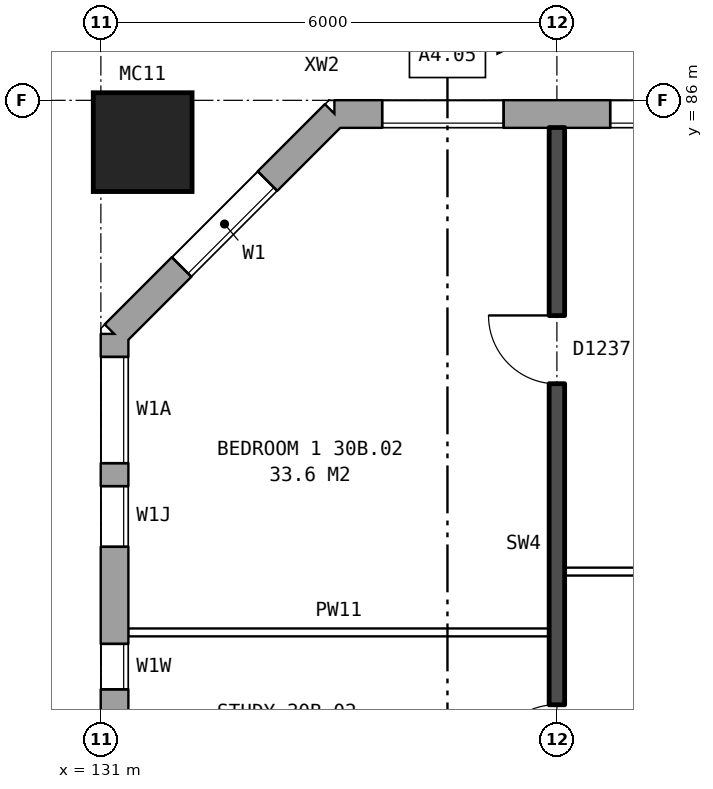
"""IFC4 building model, lengths in metres.
Left out: names, types, materials, properties, quantities, classifications, styles, units other than length and angle.
Written with IfcOpenShell. Run it as: python <this file> out.ifc"""

import sys

from ifc_helpers import new_model, si_unit, direction, frame, frame_2d, origin, origin_2d, place, context, subcontext, project, spatial, rectangle, hollow_rectangle, extrude, element, fill, save


model = new_model("IFC4")
c1 = context("Model", 3, precision=1e-05, world=origin(), true_north=direction((0.0, 1.0)))
c2 = subcontext(c1, "Body", "Model", "MODEL_VIEW")
j1 = project(units=[si_unit("LENGTHUNIT", "METRE"), si_unit("PLANEANGLEUNIT", "RADIAN")], contexts=[c1])
p1 = place(None, origin())
s1 = spatial("IfcSite", under=j1, at=p1, CompositionType="ELEMENT")
p2 = place(p1, origin())
s2 = spatial("IfcBuilding", under=s1, at=p2, CompositionType="ELEMENT")
p3 = place(p2, frame((0.0, 0.0, 108.8)))
s3 = spatial("IfcBuildingStorey", under=s2, at=p3, CompositionType="ELEMENT", Elevation=108.8)
p4 = place(p3, frame((131.55, 85.45, 0.0), z_axis=(0.0, 0.0, 1.0), x_axis=(1.0, 0.0, 0.0)))
e1 = element("IfcColumn", 1, at=p4, inside=s3, PredefinedType="COLUMN", context=c2, shape_type="SweptSolid", body=[
    extrude(hollow_rectangle(XDim=1.3, YDim=1.3, WallThickness=0.07, at=origin_2d()), origin(), (0.0, 0.0, 1.0), 3.1),
])
p5 = place(p3, frame((170.925, 85.82, 0.0), z_axis=(0.0, 0.0, 1.0), x_axis=(-1.0, 0.0, 0.0)))
e2 = element("IfcWall", 2, at=p5, inside=s3, PredefinedType="STANDARD", context=c2, shape_type="SweptSolid", body=[
    extrude(rectangle(XDim=36.851, YDim=0.36, at=frame_2d((18.425, 0.0))), origin(), (0.0, 0.0, 1.0), 2.85),
])
p6 = place(p5, frame((1.625, 0.0, 0.8)))
e3 = element("IfcOpeningElement", 3, at=p6, cuts=e2, PredefinedType="OPENING", context=c2, shape_type="SweptSolid", body=[
    extrude(rectangle(XDim=1.6, YDim=1.8, at=frame_2d((0.8, 0.9))), frame((0.0, 0.19, 0.0), z_axis=(0.0, -1.0, 0.0), x_axis=(1.0, 0.0, 0.0)), (0.0, 0.0, 1.0), 0.38),
])
p7 = place(p5, frame((4.625, 0.0, 0.8)))
e4 = element("IfcOpeningElement", 4, at=p7, cuts=e2, PredefinedType="OPENING", context=c2, shape_type="SweptSolid", body=[
    extrude(rectangle(XDim=1.6, YDim=1.8, at=frame_2d((0.8, 0.9))), frame((0.0, 0.19, 0.0), z_axis=(0.0, -1.0, 0.0), x_axis=(1.0, 0.0, 0.0)), (0.0, 0.0, 1.0), 0.38),
])
p8 = place(p5, frame((7.625, 0.0, 0.8)))
e5 = element("IfcOpeningElement", 5, at=p8, cuts=e2, PredefinedType="OPENING", context=c2, shape_type="SweptSolid", body=[
    extrude(rectangle(XDim=1.6, YDim=1.8, at=frame_2d((0.8, 0.9))), frame((0.0, 0.19, 0.0), z_axis=(0.0, -1.0, 0.0), x_axis=(1.0, 0.0, 0.0)), (0.0, 0.0, 1.0), 0.38),
])
p9 = place(p5, frame((10.625, 0.0, 0.8)))
e6 = element("IfcOpeningElement", 6, at=p9, cuts=e2, PredefinedType="OPENING", context=c2, shape_type="SweptSolid", body=[
    extrude(rectangle(XDim=1.6, YDim=1.8, at=frame_2d((0.8, 0.9))), frame((0.0, 0.19, 0.0), z_axis=(0.0, -1.0, 0.0), x_axis=(1.0, 0.0, 0.0)), (0.0, 0.0, 1.0), 0.38),
])
p10 = place(p5, frame((12.525, 0.0, 1.7)))
e7 = element("IfcOpeningElement", 7, at=p10, cuts=e2, PredefinedType="OPENING", context=c2, shape_type="SweptSolid", body=[
    extrude(rectangle(XDim=0.6, YDim=0.9, at=frame_2d((0.3, 0.45))), frame((0.0, 0.19, 0.0), z_axis=(0.0, -1.0, 0.0), x_axis=(1.0, 0.0, 0.0)), (0.0, 0.0, 1.0), 0.38),
])
p11 = place(p5, frame((16.625, 0.0, 0.8)))
e8 = element("IfcOpeningElement", 8, at=p11, cuts=e2, PredefinedType="OPENING", context=c2, shape_type="SweptSolid", body=[
    extrude(rectangle(XDim=1.6, YDim=1.8, at=frame_2d((0.8, 0.9))), frame((0.0, 0.19, 0.0), z_axis=(0.0, -1.0, 0.0), x_axis=(1.0, 0.0, 0.0)), (0.0, 0.0, 1.0), 0.38),
])
p12 = place(p5, frame((19.625, 0.0, 0.8)))
e9 = element("IfcOpeningElement", 9, at=p12, cuts=e2, PredefinedType="OPENING", context=c2, shape_type="SweptSolid", body=[
    extrude(rectangle(XDim=1.6, YDim=1.8, at=frame_2d((0.8, 0.9))), frame((0.0, 0.19, 0.0), z_axis=(0.0, -1.0, 0.0), x_axis=(1.0, 0.0, 0.0)), (0.0, 0.0, 1.0), 0.38),
])
p13 = place(p5, frame((22.125, 0.0, 0.15)))
e10 = element("IfcOpeningElement", 10, at=p13, cuts=e2, PredefinedType="OPENING", context=c2, shape_type="SweptSolid", body=[
    extrude(rectangle(XDim=1.2, YDim=0.9, at=frame_2d((0.6, 0.45))), frame((0.0, 0.19, 0.0), z_axis=(0.0, -1.0, 0.0), x_axis=(1.0, 0.0, 0.0)), (0.0, 0.0, 1.0), 0.38),
])
p14 = place(p5, frame((25.625, 0.0, 0.8)))
e11 = element("IfcOpeningElement", 11, at=p14, cuts=e2, PredefinedType="OPENING", context=c2, shape_type="SweptSolid", body=[
    extrude(rectangle(XDim=1.6, YDim=1.8, at=frame_2d((0.8, 0.9))), frame((0.0, 0.19, 0.0), z_axis=(0.0, -1.0, 0.0), x_axis=(1.0, 0.0, 0.0)), (0.0, 0.0, 1.0), 0.38),
])
p15 = place(p5, frame((28.625, 0.0, 0.8)))
e12 = element("IfcOpeningElement", 12, at=p15, cuts=e2, PredefinedType="OPENING", context=c2, shape_type="SweptSolid", body=[
    extrude(rectangle(XDim=1.6, YDim=1.8, at=frame_2d((0.8, 0.9))), frame((0.0, 0.19, 0.0), z_axis=(0.0, -1.0, 0.0), x_axis=(1.0, 0.0, 0.0)), (0.0, 0.0, 1.0), 0.38),
])
p16 = place(p5, frame((31.625, 0.0, 0.8)))
e13 = element("IfcOpeningElement", 13, at=p16, cuts=e2, PredefinedType="OPENING", context=c2, shape_type="SweptSolid", body=[
    extrude(rectangle(XDim=1.6, YDim=1.8, at=frame_2d((0.8, 0.9))), frame((0.0, 0.19, 0.0), z_axis=(0.0, -1.0, 0.0), x_axis=(1.0, 0.0, 0.0)), (0.0, 0.0, 1.0), 0.38),
])
p17 = place(p5, frame((34.625, 0.0, 0.8)))
e14 = element("IfcOpeningElement", 14, at=p17, cuts=e2, PredefinedType="OPENING", context=c2, shape_type="SweptSolid", body=[
    extrude(rectangle(XDim=1.6, YDim=1.8, at=frame_2d((0.8, 0.9))), frame((0.0, 0.19, 0.0), z_axis=(0.0, -1.0, 0.0), x_axis=(1.0, 0.0, 0.0)), (0.0, 0.0, 1.0), 0.38),
])
p18 = place(p5, frame((14.275, 0.0, 0.8)))
e15 = element("IfcOpeningElement", 15, at=p18, cuts=e2, PredefinedType="OPENING", context=c2, shape_type="SweptSolid", body=[
    extrude(rectangle(XDim=1.4, YDim=0.9, at=frame_2d((0.7, 0.45))), frame((0.0, 0.19, 0.0), z_axis=(0.0, -1.0, 0.0), x_axis=(1.0, 0.0, 0.0)), (0.0, 0.0, 1.0), 0.38),
])
p19 = place(p5, frame((23.775, 0.0, 1.65)))
e16 = element("IfcOpeningElement", 16, at=p19, cuts=e2, PredefinedType="OPENING", context=c2, shape_type="SweptSolid", body=[
    extrude(rectangle(XDim=1.0, YDim=0.9, at=frame_2d((0.5, 0.45))), frame((0.0, 0.19, 0.0), z_axis=(0.0, -1.0, 0.0), x_axis=(1.0, 0.0, 0.0)), (0.0, 0.0, 1.0), 0.38),
])
p20 = place(p3, frame((134.075, 85.82, 0.0), z_axis=(0.0, 0.0, 1.0), x_axis=(-0.707106781187, -0.707106781187, 0.0)))
e17 = element("IfcWall", 17, at=p20, inside=s3, PredefinedType="STANDARD", context=c2, shape_type="SweptSolid", body=[
    extrude(rectangle(XDim=4.094, YDim=0.36, at=frame_2d((2.047, 0.0))), origin(), (0.0, 0.0, 1.0), 2.85),
])
p21 = place(p20, frame((1.247, 0.0, 0.8)))
e18 = element("IfcOpeningElement", 18, at=p21, cuts=e17, PredefinedType="OPENING", context=c2, shape_type="SweptSolid", body=[
    extrude(rectangle(XDim=1.6, YDim=1.8, at=frame_2d((0.8, 0.9))), frame((0.0, 0.19, 0.0), z_axis=(0.0, -1.0, 0.0), x_axis=(1.0, 0.0, 0.0)), (0.0, 0.0, 1.0), 0.38),
])
p22 = place(p3, frame((131.18, 82.925, 0.0), z_axis=(0.0, 0.0, 1.0), x_axis=(0.0, -1.0, 0.0)))
e19 = element("IfcWall", 19, at=p22, inside=s3, PredefinedType="STANDARD", context=c2, shape_type="SweptSolid", body=[
    extrude(rectangle(XDim=25.851, YDim=0.36, at=frame_2d((12.925, 0.0))), origin(), (0.0, 0.0, 1.0), 2.85),
])
p23 = place(p22, frame((0.3, 0.0, 0.8)))
e20 = element("IfcOpeningElement", 20, at=p23, cuts=e19, PredefinedType="OPENING", context=c2, shape_type="SweptSolid", body=[
    extrude(rectangle(XDim=1.4, YDim=1.8, at=frame_2d((0.7, 0.9))), frame((0.0, 0.19, 0.0), z_axis=(0.0, -1.0, 0.0), x_axis=(1.0, 0.0, 0.0)), (0.0, 0.0, 1.0), 0.38),
])
p24 = place(p22, frame((4.075, 0.0, 0.25)))
e21 = element("IfcOpeningElement", 21, at=p24, cuts=e19, PredefinedType="OPENING", context=c2, shape_type="SweptSolid", body=[
    extrude(rectangle(XDim=0.6, YDim=0.9, at=frame_2d((0.3, 0.45))), frame((0.0, 0.19, 0.0), z_axis=(0.0, -1.0, 0.0), x_axis=(1.0, 0.0, 0.0)), (0.0, 0.0, 1.0), 0.38),
])
p25 = place(p22, frame((19.225, 0.0, 1.7)))
e22 = element("IfcOpeningElement", 22, at=p25, cuts=e19, PredefinedType="OPENING", context=c2, shape_type="SweptSolid", body=[
    extrude(rectangle(XDim=1.6, YDim=0.9, at=frame_2d((0.8, 0.45))), frame((0.0, 0.19, 0.0), z_axis=(0.0, -1.0, 0.0), x_axis=(1.0, 0.0, 0.0)), (0.0, 0.0, 1.0), 0.38),
])
p26 = place(p22, frame((21.975, 0.0, 0.8)))
e23 = element("IfcOpeningElement", 23, at=p26, cuts=e19, PredefinedType="OPENING", context=c2, shape_type="SweptSolid", body=[
    extrude(rectangle(XDim=1.2, YDim=0.9, at=frame_2d((0.6, 0.45))), frame((0.0, 0.19, 0.0), z_axis=(0.0, -1.0, 0.0), x_axis=(1.0, 0.0, 0.0)), (0.0, 0.0, 1.0), 0.38),
])
p27 = place(p22, frame((2.0, 0.0, 0.8)))
e24 = element("IfcOpeningElement", 24, at=p27, cuts=e19, PredefinedType="OPENING", context=c2, shape_type="SweptSolid", body=[
    extrude(rectangle(XDim=0.8, YDim=1.5, at=frame_2d((0.4, 0.75))), frame((0.0, 0.19, 0.0), z_axis=(0.0, -1.0, 0.0), x_axis=(1.0, 0.0, 0.0)), (0.0, 0.0, 1.0), 0.38),
])
p28 = place(p22, frame((5.075, 0.0, 1.65)))
e25 = element("IfcOpeningElement", 25, at=p28, cuts=e19, PredefinedType="OPENING", context=c2, shape_type="SweptSolid", body=[
    extrude(rectangle(XDim=1.4, YDim=0.9, at=frame_2d((0.7, 0.45))), frame((0.0, 0.19, 0.0), z_axis=(0.0, -1.0, 0.0), x_axis=(1.0, 0.0, 0.0)), (0.0, 0.0, 1.0), 0.38),
])
p29 = place(p22, frame((23.475, 0.0, 0.8)))
e26 = element("IfcOpeningElement", 26, at=p29, cuts=e19, PredefinedType="OPENING", context=c2, shape_type="SweptSolid", body=[
    extrude(rectangle(XDim=1.2, YDim=1.8, at=frame_2d((0.6, 0.9))), frame((0.0, 0.19, 0.0), z_axis=(0.0, -1.0, 0.0), x_axis=(1.0, 0.0, 0.0)), (0.0, 0.0, 1.0), 0.38),
])
p30 = place(p3, frame((131.36, 79.0, 0.0), z_axis=(0.0, 0.0, 1.0), x_axis=(1.0, 0.0, 0.0)))
e27 = element("IfcWall", 27, at=p30, inside=s3, PredefinedType="PARTITIONING", context=c2, shape_type="SweptSolid", body=[
    extrude(rectangle(XDim=5.54, YDim=0.1, at=frame_2d((2.77, 0.0))), origin(), (0.0, 0.0, 1.0), 2.85),
])
p31 = place(p3, frame((137.1, 79.8, 0.0), z_axis=(0.0, 0.0, 1.0), x_axis=(1.0, 0.0, 0.0)))
e28 = element("IfcWall", 28, at=p31, inside=s3, PredefinedType="PARTITIONING", context=c2, shape_type="SweptSolid", body=[
    extrude(rectangle(XDim=5.8, YDim=0.1, at=frame_2d((2.9, 0.0))), origin(), (0.0, 0.0, 1.0), 2.85),
])
p32 = place(p31, frame((1.3, 0.0, 0.0)))
e29 = element("IfcOpeningElement", 29, at=p32, cuts=e28, PredefinedType="OPENING", context=c2, shape_type="SweptSolid", body=[
    extrude(rectangle(XDim=0.9, YDim=2.1, at=frame_2d((0.45, 1.05))), frame((0.0, 0.06, 0.0), z_axis=(0.0, -1.0, 0.0), x_axis=(1.0, 0.0, 0.0)), (0.0, 0.0, 1.0), 0.12),
])
p33 = place(p31, frame((4.2, 0.0, 0.0)))
e30 = element("IfcOpeningElement", 30, at=p33, cuts=e28, PredefinedType="OPENING", context=c2, shape_type="SweptSolid", body=[
    extrude(rectangle(XDim=0.9, YDim=2.1, at=frame_2d((0.45, 1.05))), frame((0.0, 0.06, 0.0), z_axis=(0.0, -1.0, 0.0), x_axis=(1.0, 0.0, 0.0)), (0.0, 0.0, 1.0), 0.12),
])
p34 = place(p3, frame((137.0, 76.2, 0.0), z_axis=(0.0, 0.0, 1.0), x_axis=(0.0, 1.0, 0.0)))
e31 = element("IfcWall", 31, at=p34, inside=s3, PredefinedType="SOLIDWALL", context=c2, shape_type="SweptSolid", body=[
    extrude(rectangle(XDim=9.44, YDim=0.2, at=frame_2d((4.72, 0.0))), origin(), (0.0, 0.0, 1.0), 2.85),
])
p35 = place(p34, frame((6.07, 0.0, 0.0)))
e32 = element("IfcOpeningElement", 32, at=p35, cuts=e31, PredefinedType="OPENING", context=c2, shape_type="SweptSolid", body=[
    extrude(rectangle(XDim=0.9, YDim=2.1, at=frame_2d((0.45, 1.05))), frame((0.0, 0.11, 0.0), z_axis=(0.0, -1.0, 0.0), x_axis=(1.0, 0.0, 0.0)), (0.0, 0.0, 1.0), 0.22),
])
p36 = place(p34, frame((0.95, 0.0, 0.0)))
e33 = element("IfcOpeningElement", 33, at=p36, cuts=e31, PredefinedType="OPENING", context=c2, shape_type="SweptSolid", body=[
    extrude(rectangle(XDim=0.9, YDim=2.1, at=frame_2d((0.45, 1.05))), frame((0.0, 0.11, 0.0), z_axis=(0.0, -1.0, 0.0), x_axis=(1.0, 0.0, 0.0)), (0.0, 0.0, 1.0), 0.22),
])
p37 = place(p16, origin())
e34 = element("IfcWindow", 34, at=p37, inside=s3, PartitioningType="SINGLE_PANEL", PredefinedType="WINDOW", context=c2, shape_type="SweptSolid", body=[
    extrude(rectangle(XDim=1.6, YDim=1.8, at=frame_2d((0.8, 0.9))), frame((0.0, 0.15, 0.0), z_axis=(0.0, -1.0, 0.0), x_axis=(1.0, 0.0, 0.0)), (0.0, 0.0, 1.0), 0.06),
])
fill(e13, e34)
p38 = place(p17, origin())
e35 = element("IfcWindow", 35, at=p38, inside=s3, PartitioningType="SINGLE_PANEL", PredefinedType="WINDOW", context=c2, shape_type="SweptSolid", body=[
    extrude(rectangle(XDim=1.6, YDim=1.8, at=frame_2d((0.8, 0.9))), frame((0.0, 0.15, 0.0), z_axis=(0.0, -1.0, 0.0), x_axis=(1.0, 0.0, 0.0)), (0.0, 0.0, 1.0), 0.06),
])
fill(e14, e35)
p39 = place(p21, origin())
e36 = element("IfcWindow", 36, at=p39, inside=s3, PartitioningType="SINGLE_PANEL", PredefinedType="WINDOW", context=c2, shape_type="SweptSolid", body=[
    extrude(rectangle(XDim=1.6, YDim=1.8, at=frame_2d((0.8, 0.9))), frame((0.0, 0.15, 0.0), z_axis=(0.0, -1.0, 0.0), x_axis=(1.0, 0.0, 0.0)), (0.0, 0.0, 1.0), 0.06),
])
fill(e18, e36)
p40 = place(p23, origin())
e37 = element("IfcWindow", 37, at=p40, inside=s3, PartitioningType="SINGLE_PANEL", PredefinedType="WINDOW", context=c2, shape_type="SweptSolid", body=[
    extrude(rectangle(XDim=1.4, YDim=1.8, at=frame_2d((0.7, 0.9))), frame((0.0, 0.15, 0.0), z_axis=(0.0, -1.0, 0.0), x_axis=(1.0, 0.0, 0.0)), (0.0, 0.0, 1.0), 0.06),
])
fill(e20, e37)
p41 = place(p24, origin())
e38 = element("IfcWindow", 38, at=p41, inside=s3, PartitioningType="SINGLE_PANEL", PredefinedType="WINDOW", context=c2, shape_type="SweptSolid", body=[
    extrude(rectangle(XDim=0.6, YDim=0.9, at=frame_2d((0.3, 0.45))), frame((0.0, 0.15, 0.0), z_axis=(0.0, -1.0, 0.0), x_axis=(1.0, 0.0, 0.0)), (0.0, 0.0, 1.0), 0.06),
])
fill(e21, e38)
p42 = place(p35, origin())
e39 = element("IfcDoor", 39, at=p42, inside=s3, OperationType="SINGLE_SWING_RIGHT", PredefinedType="DOOR", context=c2, shape_type="SweptSolid", body=[
    extrude(rectangle(XDim=0.9, YDim=2.1, at=frame_2d((0.45, 1.05))), frame((0.0, 0.025, 0.0), z_axis=(0.0, -1.0, 0.0), x_axis=(1.0, 0.0, 0.0)), (0.0, 0.0, 1.0), 0.05),
])
fill(e32, e39)
p43 = place(p36, origin())
e40 = element("IfcDoor", 40, at=p43, inside=s3, OperationType="SINGLE_SWING_LEFT", PredefinedType="DOOR", context=c2, shape_type="SweptSolid", body=[
    extrude(rectangle(XDim=0.9, YDim=2.1, at=frame_2d((0.45, 1.05))), frame((0.0, 0.025, 0.0), z_axis=(0.0, -1.0, 0.0), x_axis=(1.0, 0.0, 0.0)), (0.0, 0.0, 1.0), 0.05),
])
fill(e33, e40)
p44 = place(p27, origin())
e41 = element("IfcWindow", 41, at=p44, inside=s3, PartitioningType="SINGLE_PANEL", PredefinedType="WINDOW", context=c2, shape_type="SweptSolid", body=[
    extrude(rectangle(XDim=0.8, YDim=1.5, at=frame_2d((0.4, 0.75))), frame((0.0, 0.15, 0.0), z_axis=(0.0, -1.0, 0.0), x_axis=(1.0, 0.0, 0.0)), (0.0, 0.0, 1.0), 0.06),
])
fill(e24, e41)
save(model, sys.argv[1])
